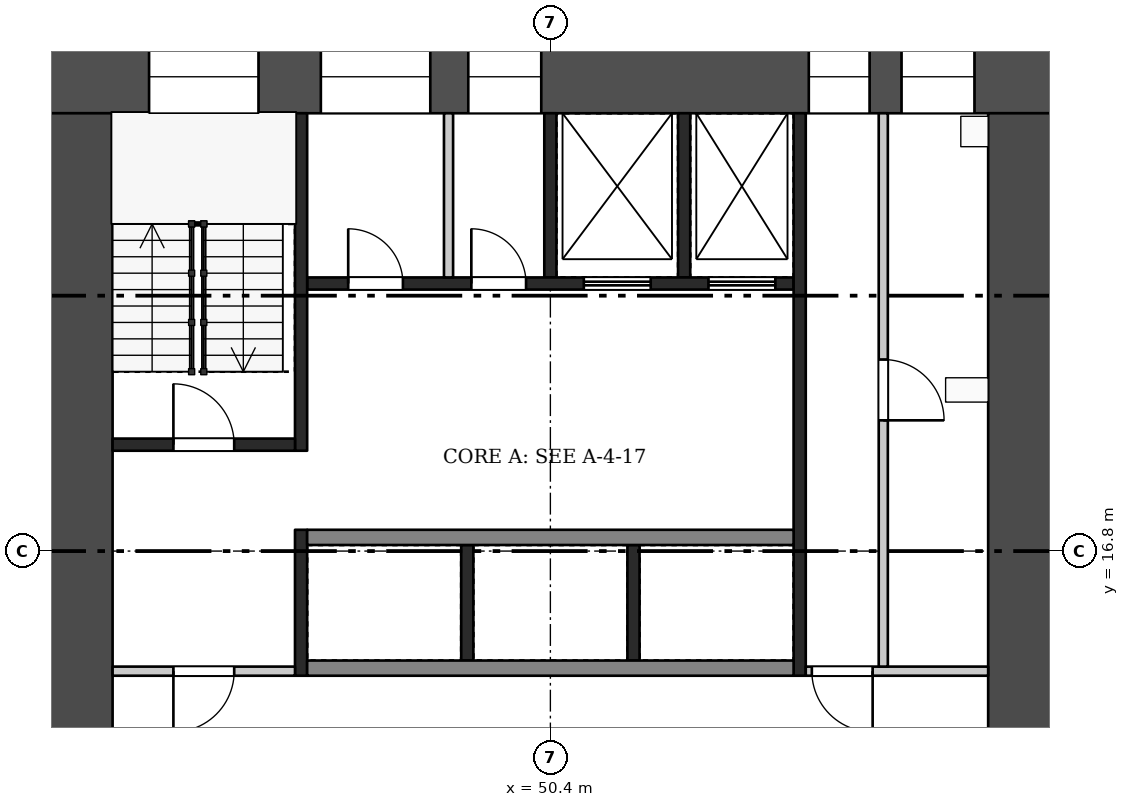
"""IFC4 building model, lengths in metres.
Left out: names, types, materials, properties, quantities, classifications, styles, units other than length and angle.
Written with IfcOpenShell. Run it as: python <this file> out.ifc"""

import sys

from ifc_helpers import new_model, si_unit, direction, frame, frame_2d, origin, place, context, subcontext, project, spatial, rectangle, extrude, element, fill, save


model = new_model("IFC4")
c1 = context("Model", 3, precision=1e-05, world=origin(), true_north=direction((0.0, 1.0)))
c2 = subcontext(c1, "Body", "Model", "MODEL_VIEW")
j1 = project(units=[si_unit("LENGTHUNIT", "METRE"), si_unit("PLANEANGLEUNIT", "RADIAN")], contexts=[c1])
p1 = place(None, origin())
s1 = spatial("IfcSite", under=j1, at=p1, CompositionType="ELEMENT")
p2 = place(p1, origin())
s2 = spatial("IfcBuilding", under=s1, at=p2, CompositionType="ELEMENT")
p3 = place(p2, frame((0.0, 0.0, 102.2)))
s3 = spatial("IfcBuildingStorey", under=s2, at=p3, CompositionType="ELEMENT", Elevation=102.2)
p4 = place(p3, frame((42.0, 24.6, 0.0), z_axis=(0.0, 0.0, 1.0), x_axis=(1.0, 0.0, 0.0)))
e1 = element("IfcWall", 1, at=p4, inside=s3, PredefinedType="SHEAR", context=c2, shape_type="SweptSolid", body=[
    extrude(rectangle(XDim=16.8, YDim=1.2, at=frame_2d((8.4, 0.0))), origin(), (0.0, 0.0, 1.0), 3.22),
])
p5 = place(p4, frame((1.8, 0.0, 0.5)))
e2 = element("IfcOpeningElement", 2, at=p5, cuts=e1, PredefinedType="OPENING", context=c2, shape_type="SweptSolid", body=[
    extrude(rectangle(XDim=1.8, YDim=2.4, at=frame_2d((0.9, 1.2))), frame((0.0, 0.61, 0.0), z_axis=(0.0, -1.0, 0.0), x_axis=(1.0, 0.0, 0.0)), (0.0, 0.0, 1.0), 1.22),
])
p6 = place(p4, frame((4.625, 0.0, 1.6)))
e3 = element("IfcOpeningElement", 3, at=p6, cuts=e1, PredefinedType="OPENING", context=c2, shape_type="SweptSolid", body=[
    extrude(rectangle(XDim=1.8, YDim=1.2, at=frame_2d((0.9, 0.6))), frame((0.0, 0.61, 0.0), z_axis=(0.0, -1.0, 0.0), x_axis=(1.0, 0.0, 0.0)), (0.0, 0.0, 1.0), 1.22),
])
p7 = place(p4, frame((7.05, 0.0, 1.6)))
e4 = element("IfcOpeningElement", 4, at=p7, cuts=e1, PredefinedType="OPENING", context=c2, shape_type="SweptSolid", body=[
    extrude(rectangle(XDim=1.2, YDim=1.2, at=frame_2d((0.6, 0.6))), frame((0.0, 0.61, 0.0), z_axis=(0.0, -1.0, 0.0), x_axis=(1.0, 0.0, 0.0)), (0.0, 0.0, 1.0), 1.22),
])
p8 = place(p4, frame((12.65, 0.0, 0.6)))
e5 = element("IfcOpeningElement", 5, at=p8, cuts=e1, PredefinedType="OPENING", context=c2, shape_type="SweptSolid", body=[
    extrude(rectangle(XDim=1.0, YDim=2.1, at=frame_2d((0.5, 1.05))), frame((0.0, 0.61, 0.0), z_axis=(0.0, -1.0, 0.0), x_axis=(1.0, 0.0, 0.0)), (0.0, 0.0, 1.0), 1.22),
])
p9 = place(p4, frame((14.175, 0.0, 1.6)))
e6 = element("IfcOpeningElement", 6, at=p9, cuts=e1, PredefinedType="OPENING", context=c2, shape_type="SweptSolid", body=[
    extrude(rectangle(XDim=1.2, YDim=1.2, at=frame_2d((0.6, 0.6))), frame((0.0, 0.61, 0.0), z_axis=(0.0, -1.0, 0.0), x_axis=(1.0, 0.0, 0.0)), (0.0, 0.0, 1.0), 1.22),
])
p10 = place(p3, frame((42.6, 9.6, 0.0), z_axis=(0.0, 0.0, 1.0), x_axis=(0.0, 1.0, 0.0)))
e7 = element("IfcWall", 7, at=p10, inside=s3, PredefinedType="SHEAR", context=c2, shape_type="SweptSolid", body=[
    extrude(rectangle(XDim=14.4, YDim=1.2, at=frame_2d((7.2, 0.0))), origin(), (0.0, 0.0, 1.0), 3.22),
])
p11 = place(p10, frame((2.1, 0.0, 0.0)))
e8 = element("IfcOpeningElement", 8, at=p11, cuts=e7, PredefinedType="OPENING", context=c2, shape_type="SweptSolid", body=[
    extrude(rectangle(XDim=1.8, YDim=2.1, at=frame_2d((0.9, 1.05))), frame((0.0, 0.61, 0.0), z_axis=(0.0, -1.0, 0.0), x_axis=(1.0, 0.0, 0.0)), (0.0, 0.0, 1.0), 1.22),
])
p12 = place(p3, frame((58.2, 9.6, 0.0), z_axis=(0.0, 0.0, 1.0), x_axis=(0.0, 1.0, 0.0)))
e9 = element("IfcWall", 9, at=p12, inside=s3, PredefinedType="SHEAR", context=c2, shape_type="SweptSolid", body=[
    extrude(rectangle(XDim=14.4, YDim=1.2, at=frame_2d((7.2, 0.0))), origin(), (0.0, 0.0, 1.0), 3.22),
])
p13 = place(p12, frame((2.1, 0.0, 0.0)))
e10 = element("IfcOpeningElement", 10, at=p13, cuts=e9, PredefinedType="OPENING", context=c2, shape_type="SweptSolid", body=[
    extrude(rectangle(XDim=1.8, YDim=2.1, at=frame_2d((0.9, 1.05))), frame((0.0, 0.61, 0.0), z_axis=(0.0, -1.0, 0.0), x_axis=(1.0, 0.0, 0.0)), (0.0, 0.0, 1.0), 1.22),
])
for number, where, z_axis, x_axis in (
    (11, (49.033, 15.0, 0.0), (0.0, 0.0, 1.0), (0.0, 1.0, 0.0)),
    (12, (51.767, 15.0, 0.0), (0.0, 0.0, 1.0), (0.0, 1.0, 0.0)),
):
    element("IfcWall", number, at=place(p3, frame(where, z_axis=z_axis, x_axis=x_axis)), inside=s3, PredefinedType="SHEAR", context=c2, shape_type="SweptSolid", body=[
        extrude(rectangle(XDim=1.9, YDim=0.2, at=frame_2d((0.95, 0.0))), origin(), (0.0, 0.0, 1.0), 3.22),
    ])
for number, where, z_axis, x_axis in (
    (13, (46.4, 14.875, 0.0), (0.0, 0.0, 1.0), (1.0, 0.0, 0.0)),
    (14, (46.4, 17.025, 0.0), (0.0, 0.0, 1.0), (1.0, 0.0, 0.0)),
):
    element("IfcWall", number, at=place(p3, frame(where, z_axis=z_axis, x_axis=x_axis)), inside=s3, PredefinedType="SHEAR", context=c2, shape_type="SweptSolid", body=[
        extrude(rectangle(XDim=8.0, YDim=0.25, at=frame_2d((4.0, 0.0))), origin(), (0.0, 0.0, 1.0), 3.22),
    ])
for number, where, z_axis, x_axis in (
    (15, (50.4, 21.3, 0.0), (0.0, 0.0, 1.0), (0.0, 1.0, 0.0)),
    (16, (52.6, 21.3, 0.0), (0.0, 0.0, 1.0), (0.0, 1.0, 0.0)),
):
    element("IfcWall", number, at=place(p3, frame(where, z_axis=z_axis, x_axis=x_axis)), inside=s3, PredefinedType="SHEAR", context=c2, shape_type="SweptSolid", body=[
        extrude(rectangle(XDim=2.7, YDim=0.2, at=frame_2d((1.35, 0.0))), origin(), (0.0, 0.0, 1.0), 3.22),
    ])
p14 = place(p3, frame((48.725, 21.3, 0.0), z_axis=(0.0, 0.0, 1.0), x_axis=(0.0, 1.0, 0.0)))
e17 = element("IfcWall", 17, at=p14, inside=s3, PredefinedType="PARTITIONING", context=c2, shape_type="SweptSolid", body=[
    extrude(rectangle(XDim=2.7, YDim=0.15, at=frame_2d((1.35, 0.0))), origin(), (0.0, 0.0, 1.0), 3.22),
])
p15 = place(p3, frame((46.4, 21.2, 0.0), z_axis=(0.0, 0.0, 1.0), x_axis=(1.0, 0.0, 0.0)))
e18 = element("IfcWall", 18, at=p15, inside=s3, PredefinedType="SHEAR", context=c2, shape_type="SweptSolid", body=[
    extrude(rectangle(XDim=8.0, YDim=0.2, at=frame_2d((4.0, 0.0))), origin(), (0.0, 0.0, 1.0), 3.22),
])
p16 = place(p15, frame((0.675, 0.0, 0.0)))
e19 = element("IfcOpeningElement", 19, at=p16, cuts=e18, PredefinedType="OPENING", context=c2, shape_type="SweptSolid", body=[
    extrude(rectangle(XDim=0.9, YDim=2.1, at=frame_2d((0.45, 1.05))), frame((0.0, 0.11, 0.0), z_axis=(0.0, -1.0, 0.0), x_axis=(1.0, 0.0, 0.0)), (0.0, 0.0, 1.0), 0.22),
])
p17 = place(p15, frame((2.7, 0.0, 0.0)))
e20 = element("IfcOpeningElement", 20, at=p17, cuts=e18, PredefinedType="OPENING", context=c2, shape_type="SweptSolid", body=[
    extrude(rectangle(XDim=0.9, YDim=2.1, at=frame_2d((0.45, 1.05))), frame((0.0, 0.11, 0.0), z_axis=(0.0, -1.0, 0.0), x_axis=(1.0, 0.0, 0.0)), (0.0, 0.0, 1.0), 0.22),
])
p18 = place(p15, frame((4.55, 0.0, 0.0)))
e21 = element("IfcOpeningElement", 21, at=p18, cuts=e18, PredefinedType="OPENING", context=c2, shape_type="SweptSolid", body=[
    extrude(rectangle(XDim=1.1, YDim=2.1, at=frame_2d((0.55, 1.05))), frame((0.0, 0.11, 0.0), z_axis=(0.0, -1.0, 0.0), x_axis=(1.0, 0.0, 0.0)), (0.0, 0.0, 1.0), 0.22),
])
p19 = place(p15, frame((6.6, 0.0, 0.0)))
e22 = element("IfcOpeningElement", 22, at=p19, cuts=e18, PredefinedType="OPENING", context=c2, shape_type="SweptSolid", body=[
    extrude(rectangle(XDim=1.1, YDim=2.1, at=frame_2d((0.55, 1.05))), frame((0.0, 0.11, 0.0), z_axis=(0.0, -1.0, 0.0), x_axis=(1.0, 0.0, 0.0)), (0.0, 0.0, 1.0), 0.22),
])
p20 = place(p3, frame((46.3, 14.75, 0.0), z_axis=(0.0, 0.0, 1.0), x_axis=(0.0, 1.0, 0.0)))
e23 = element("IfcWall", 23, at=p20, inside=s3, PredefinedType="SHEAR", context=c2, shape_type="SweptSolid", body=[
    extrude(rectangle(XDim=2.4, YDim=0.2, at=frame_2d((1.2, 0.0))), origin(), (0.0, 0.0, 1.0), 3.22),
])
p21 = place(p3, frame((46.3, 18.45, 0.0), z_axis=(0.0, 0.0, 1.0), x_axis=(0.0, 1.0, 0.0)))
e24 = element("IfcWall", 24, at=p21, inside=s3, PredefinedType="SHEAR", context=c2, shape_type="SweptSolid", body=[
    extrude(rectangle(XDim=5.55, YDim=0.2, at=frame_2d((2.775, 0.0))), origin(), (0.0, 0.0, 1.0), 3.22),
])
p22 = place(p3, frame((43.2, 14.825, 0.0), z_axis=(0.0, 0.0, 1.0), x_axis=(1.0, 0.0, 0.0)))
e25 = element("IfcWall", 25, at=p22, inside=s3, PredefinedType="PARTITIONING", context=c2, shape_type="SweptSolid", body=[
    extrude(rectangle(XDim=3.0, YDim=0.15, at=frame_2d((1.5, 0.0))), origin(), (0.0, 0.0, 1.0), 3.22),
])
p23 = place(p22, frame((1.0, 0.0, 0.0)))
e26 = element("IfcOpeningElement", 26, at=p23, cuts=e25, PredefinedType="OPENING", context=c2, shape_type="SweptSolid", body=[
    extrude(rectangle(XDim=1.0, YDim=2.1, at=frame_2d((0.5, 1.05))), frame((0.0, 0.085, 0.0), z_axis=(0.0, -1.0, 0.0), x_axis=(1.0, 0.0, 0.0)), (0.0, 0.0, 1.0), 0.17),
])
p24 = place(p3, frame((43.2, 18.55, 0.0), z_axis=(0.0, 0.0, 1.0), x_axis=(1.0, 0.0, 0.0)))
e27 = element("IfcWall", 27, at=p24, inside=s3, PredefinedType="SHEAR", context=c2, shape_type="SweptSolid", body=[
    extrude(rectangle(XDim=3.0, YDim=0.2, at=frame_2d((1.5, 0.0))), origin(), (0.0, 0.0, 1.0), 3.22),
])
p25 = place(p24, frame((1.0, 0.0, 0.0)))
e28 = element("IfcOpeningElement", 28, at=p25, cuts=e27, PredefinedType="OPENING", context=c2, shape_type="SweptSolid", body=[
    extrude(rectangle(XDim=1.0, YDim=2.1, at=frame_2d((0.5, 1.05))), frame((0.0, 0.11, 0.0), z_axis=(0.0, -1.0, 0.0), x_axis=(1.0, 0.0, 0.0)), (0.0, 0.0, 1.0), 0.22),
])
p26 = place(p3, frame((54.5, 14.75, 0.0), z_axis=(0.0, 0.0, 1.0), x_axis=(0.0, 1.0, 0.0)))
e29 = element("IfcWall", 29, at=p26, inside=s3, PredefinedType="SHEAR", context=c2, shape_type="SweptSolid", body=[
    extrude(rectangle(XDim=9.25, YDim=0.2, at=frame_2d((4.625, 0.0))), origin(), (0.0, 0.0, 1.0), 3.22),
])
p27 = place(p3, frame((54.6, 14.825, 0.0), z_axis=(0.0, 0.0, 1.0), x_axis=(1.0, 0.0, 0.0)))
e30 = element("IfcWall", 30, at=p27, inside=s3, PredefinedType="PARTITIONING", context=c2, shape_type="SweptSolid", body=[
    extrude(rectangle(XDim=3.0, YDim=0.15, at=frame_2d((1.5, 0.0))), origin(), (0.0, 0.0, 1.0), 3.22),
])
p28 = place(p27, frame((0.1, 0.0, 0.0)))
e31 = element("IfcOpeningElement", 31, at=p28, cuts=e30, PredefinedType="OPENING", context=c2, shape_type="SweptSolid", body=[
    extrude(rectangle(XDim=1.0, YDim=2.1, at=frame_2d((0.5, 1.05))), frame((0.0, 0.085, 0.0), z_axis=(0.0, -1.0, 0.0), x_axis=(1.0, 0.0, 0.0)), (0.0, 0.0, 1.0), 0.17),
])
p29 = place(p3, frame((55.875, 14.9, 0.0), z_axis=(0.0, 0.0, 1.0), x_axis=(0.0, 1.0, 0.0)))
e32 = element("IfcWall", 32, at=p29, inside=s3, PredefinedType="PARTITIONING", context=c2, shape_type="SweptSolid", body=[
    extrude(rectangle(XDim=9.1, YDim=0.15, at=frame_2d((4.55, 0.0))), origin(), (0.0, 0.0, 1.0), 3.22),
])
p30 = place(p29, frame((4.05, 0.0, 0.0)))
e33 = element("IfcOpeningElement", 33, at=p30, cuts=e32, PredefinedType="OPENING", context=c2, shape_type="SweptSolid", body=[
    extrude(rectangle(XDim=1.0, YDim=2.1, at=frame_2d((0.5, 1.05))), frame((0.0, 0.085, 0.0), z_axis=(0.0, -1.0, 0.0), x_axis=(1.0, 0.0, 0.0)), (0.0, 0.0, 1.0), 0.17),
])
p31 = place(p16, origin())
e34 = element("IfcDoor", 34, at=p31, inside=s3, OperationType="SINGLE_SWING_LEFT", PredefinedType="DOOR", context=c2, shape_type="SweptSolid", body=[
    extrude(rectangle(XDim=0.9, YDim=2.1, at=frame_2d((0.45, 1.05))), frame((0.0, 0.025, 0.0), z_axis=(0.0, -1.0, 0.0), x_axis=(1.0, 0.0, 0.0)), (0.0, 0.0, 1.0), 0.05),
])
fill(e19, e34)
p32 = place(p17, origin())
e35 = element("IfcDoor", 35, at=p32, inside=s3, OperationType="SINGLE_SWING_LEFT", PredefinedType="DOOR", context=c2, shape_type="SweptSolid", body=[
    extrude(rectangle(XDim=0.9, YDim=2.1, at=frame_2d((0.45, 1.05))), frame((0.0, 0.025, 0.0), z_axis=(0.0, -1.0, 0.0), x_axis=(1.0, 0.0, 0.0)), (0.0, 0.0, 1.0), 0.05),
])
fill(e20, e35)
p33 = place(p18, origin())
e36 = element("IfcDoor", 36, at=p33, inside=s3, OperationType="DOUBLE_DOOR_SLIDING", PredefinedType="DOOR", context=c2, shape_type="SweptSolid", body=[
    extrude(rectangle(XDim=1.1, YDim=2.1, at=frame_2d((0.55, 1.05))), frame((0.0, 0.025, 0.0), z_axis=(0.0, -1.0, 0.0), x_axis=(1.0, 0.0, 0.0)), (0.0, 0.0, 1.0), 0.05),
])
fill(e21, e36)
p34 = place(p19, origin())
e37 = element("IfcDoor", 37, at=p34, inside=s3, OperationType="DOUBLE_DOOR_SLIDING", PredefinedType="DOOR", context=c2, shape_type="SweptSolid", body=[
    extrude(rectangle(XDim=1.1, YDim=2.1, at=frame_2d((0.55, 1.05))), frame((0.0, 0.025, 0.0), z_axis=(0.0, -1.0, 0.0), x_axis=(1.0, 0.0, 0.0)), (0.0, 0.0, 1.0), 0.05),
])
fill(e22, e37)
p35 = place(p23, frame((1.0, 0.0, 0.0), z_axis=(0.0, 0.0, 1.0), x_axis=(-1.0, 0.0, 0.0)))
e38 = element("IfcDoor", 38, at=p35, inside=s3, OperationType="SINGLE_SWING_RIGHT", PredefinedType="DOOR", context=c2, shape_type="SweptSolid", body=[
    extrude(rectangle(XDim=1.0, YDim=2.1, at=frame_2d((0.5, 1.05))), frame((0.0, 0.025, 0.0), z_axis=(0.0, -1.0, 0.0), x_axis=(1.0, 0.0, 0.0)), (0.0, 0.0, 1.0), 0.05),
])
fill(e26, e38)
p36 = place(p25, origin())
e39 = element("IfcDoor", 39, at=p36, inside=s3, OperationType="SINGLE_SWING_LEFT", PredefinedType="DOOR", context=c2, shape_type="SweptSolid", body=[
    extrude(rectangle(XDim=1.0, YDim=2.1, at=frame_2d((0.5, 1.05))), frame((0.0, 0.025, 0.0), z_axis=(0.0, -1.0, 0.0), x_axis=(1.0, 0.0, 0.0)), (0.0, 0.0, 1.0), 0.05),
])
fill(e28, e39)
p37 = place(p28, frame((1.0, 0.0, 0.0), z_axis=(0.0, 0.0, 1.0), x_axis=(-1.0, 0.0, 0.0)))
e40 = element("IfcDoor", 40, at=p37, inside=s3, OperationType="SINGLE_SWING_LEFT", PredefinedType="DOOR", context=c2, shape_type="SweptSolid", body=[
    extrude(rectangle(XDim=1.0, YDim=2.1, at=frame_2d((0.5, 1.05))), frame((0.0, 0.025, 0.0), z_axis=(0.0, -1.0, 0.0), x_axis=(1.0, 0.0, 0.0)), (0.0, 0.0, 1.0), 0.05),
])
fill(e31, e40)
p38 = place(p30, frame((1.0, 0.0, 0.0), z_axis=(0.0, 0.0, 1.0), x_axis=(-1.0, 0.0, 0.0)))
e41 = element("IfcDoor", 41, at=p38, inside=s3, OperationType="SINGLE_SWING_RIGHT", PredefinedType="DOOR", context=c2, shape_type="SweptSolid", body=[
    extrude(rectangle(XDim=1.0, YDim=2.1, at=frame_2d((0.5, 1.05))), frame((0.0, 0.025, 0.0), z_axis=(0.0, -1.0, 0.0), x_axis=(1.0, 0.0, 0.0)), (0.0, 0.0, 1.0), 0.05),
])
fill(e33, e41)
p39 = place(p5, origin())
e42 = element("IfcWindow", 42, at=p39, inside=s3, PartitioningType="SINGLE_PANEL", PredefinedType="WINDOW", context=c2, shape_type="SweptSolid", body=[
    extrude(rectangle(XDim=1.8, YDim=2.4, at=frame_2d((0.9, 1.2))), frame((0.0, 0.03, 0.0), z_axis=(0.0, -1.0, 0.0), x_axis=(1.0, 0.0, 0.0)), (0.0, 0.0, 1.0), 0.06),
])
fill(e2, e42)
p40 = place(p6, origin())
e43 = element("IfcWindow", 43, at=p40, inside=s3, PartitioningType="SINGLE_PANEL", PredefinedType="WINDOW", context=c2, shape_type="SweptSolid", body=[
    extrude(rectangle(XDim=1.8, YDim=1.2, at=frame_2d((0.9, 0.6))), frame((0.0, 0.03, 0.0), z_axis=(0.0, -1.0, 0.0), x_axis=(1.0, 0.0, 0.0)), (0.0, 0.0, 1.0), 0.06),
])
fill(e3, e43)
p41 = place(p7, origin())
e44 = element("IfcWindow", 44, at=p41, inside=s3, PartitioningType="SINGLE_PANEL", PredefinedType="WINDOW", context=c2, shape_type="SweptSolid", body=[
    extrude(rectangle(XDim=1.2, YDim=1.2, at=frame_2d((0.6, 0.6))), frame((0.0, 0.03, 0.0), z_axis=(0.0, -1.0, 0.0), x_axis=(1.0, 0.0, 0.0)), (0.0, 0.0, 1.0), 0.06),
])
fill(e4, e44)
p42 = place(p8, origin())
e45 = element("IfcWindow", 45, at=p42, inside=s3, PartitioningType="SINGLE_PANEL", PredefinedType="WINDOW", context=c2, shape_type="SweptSolid", body=[
    extrude(rectangle(XDim=1.0, YDim=2.1, at=frame_2d((0.5, 1.05))), frame((0.0, 0.03, 0.0), z_axis=(0.0, -1.0, 0.0), x_axis=(1.0, 0.0, 0.0)), (0.0, 0.0, 1.0), 0.06),
])
fill(e5, e45)
p43 = place(p9, origin())
e46 = element("IfcWindow", 46, at=p43, inside=s3, PartitioningType="SINGLE_PANEL", PredefinedType="WINDOW", context=c2, shape_type="SweptSolid", body=[
    extrude(rectangle(XDim=1.2, YDim=1.2, at=frame_2d((0.6, 0.6))), frame((0.0, 0.03, 0.0), z_axis=(0.0, -1.0, 0.0), x_axis=(1.0, 0.0, 0.0)), (0.0, 0.0, 1.0), 0.06),
])
fill(e6, e46)
save(model, sys.argv[1])
